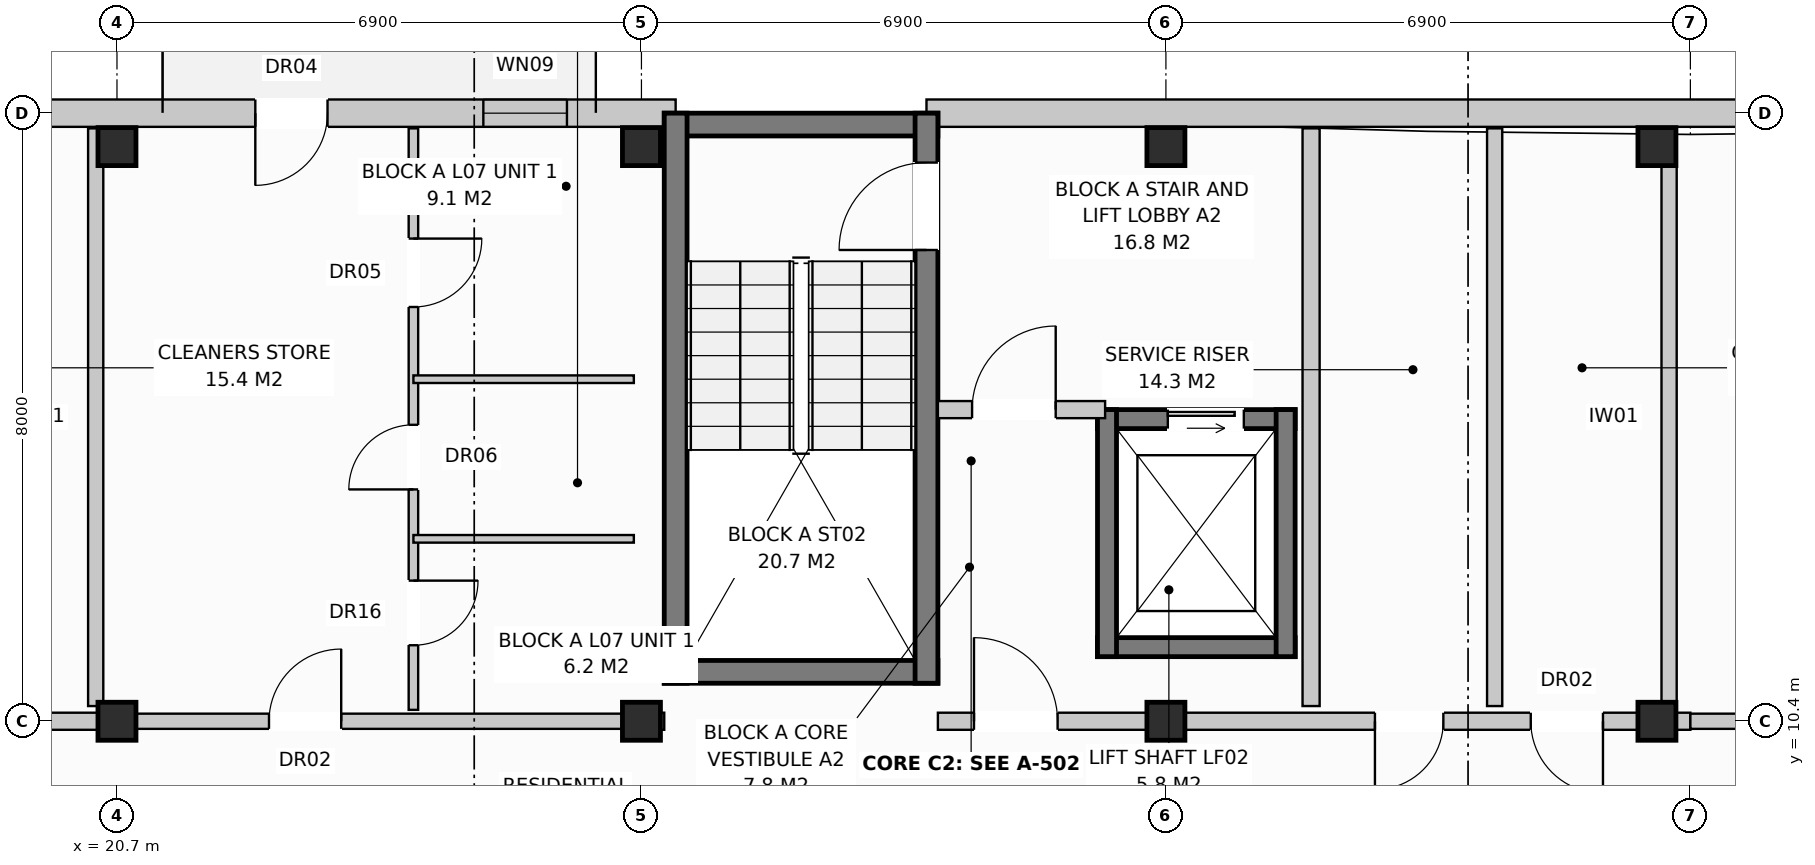
"""IFC4 building model, lengths in metres.
Left out: names, types, materials, properties, quantities, classifications, styles, units other than length and angle.
Written with IfcOpenShell. Run it as: python <this file> out.ifc"""

import sys

from ifc_helpers import new_model, si_unit, direction, frame, frame_2d, origin, origin_with_axes, origin_2d, place, context, subcontext, project, spatial, rectangle, extrude, element, fill, save


model = new_model("IFC4")
c1 = context("Model", 3, precision=1e-05, world=origin(), true_north=direction((0.0, 1.0)))
c2 = subcontext(c1, "Body", "Model", "MODEL_VIEW")
j1 = project(units=[si_unit("LENGTHUNIT", "METRE"), si_unit("PLANEANGLEUNIT", "RADIAN")], contexts=[c1])
p1 = place(None, origin())
s1 = spatial("IfcSite", under=j1, at=p1, CompositionType="ELEMENT")
p2 = place(p1, origin())
s2 = spatial("IfcBuilding", under=s1, at=p2, CompositionType="ELEMENT")
p3 = place(p2, frame((0.0, 0.0, 24.0)))
s3 = spatial("IfcBuildingStorey", under=s2, at=p3, CompositionType="ELEMENT", Elevation=24.0)
for number, where, z_axis, x_axis in (
    (1, (20.7, 10.4, 0.0), (0.0, 0.0, 1.0), (1.0, 0.0, 0.0)),
    (2, (20.7, 17.96, 0.0), (0.0, 0.0, 1.0), (1.0, 0.0, 0.0)),
    (3, (27.6, 10.4, 0.0), (0.0, 0.0, 1.0), (1.0, 0.0, 0.0)),
    (4, (27.6, 17.96, 0.0), (0.0, 0.0, 1.0), (1.0, 0.0, 0.0)),
    (5, (34.5, 10.4, 0.0), (0.0, 0.0, 1.0), (1.0, 0.0, 0.0)),
    (6, (34.5, 17.96, 0.0), (0.0, 0.0, 1.0), (1.0, 0.0, 0.0)),
    (7, (40.96, 10.4, 0.0), (0.0, 0.0, 1.0), (1.0, 0.0, 0.0)),
    (8, (40.96, 17.96, 0.0), (0.0, 0.0, 1.0), (1.0, 0.0, 0.0)),
):
    element("IfcColumn", number, at=place(p3, frame(where, z_axis=z_axis, x_axis=x_axis)), inside=s3, PredefinedType="COLUMN", context=c2, shape_type="SweptSolid", body=[
        extrude(rectangle(XDim=0.5, YDim=0.5, at=origin_2d()), origin(), (0.0, 0.0, 1.0), 3.2),
    ])
p4 = place(p3, frame((10.65, 18.4, 0.0), z_axis=(0.0, 0.0, 1.0), x_axis=(1.0, 0.0, 0.0)))
e9 = element("IfcWall", 9, at=p4, inside=s3, PredefinedType="STANDARD", context=c2, shape_type="SweptSolid", body=[
    extrude(rectangle(XDim=17.4, YDim=0.36, at=frame_2d((8.7, 0.0))), origin(), (0.0, 0.0, 1.0), 2.95),
])
p5 = place(p4, frame((11.87, 0.0, 0.0)))
e10 = element("IfcOpeningElement", 10, at=p5, cuts=e9, PredefinedType="OPENING", context=c2, shape_type="SweptSolid", body=[
    extrude(rectangle(XDim=0.95, YDim=2.1, at=frame_2d((0.475, 1.05))), frame((0.0, 0.192, 0.0), z_axis=(0.0, -1.0, 0.0), x_axis=(1.0, 0.0, 0.0)), (0.0, 0.0, 1.0), 0.384),
])
p6 = place(p4, frame((14.87, 0.0, 0.72)))
e11 = element("IfcOpeningElement", 11, at=p6, cuts=e9, PredefinedType="OPENING", context=c2, shape_type="SweptSolid", body=[
    extrude(rectangle(XDim=1.1, YDim=1.5, at=frame_2d((0.55, 0.75))), frame((0.0, 0.192, 0.0), z_axis=(0.0, -1.0, 0.0), x_axis=(1.0, 0.0, 0.0)), (0.0, 0.0, 1.0), 0.384),
])
p7 = place(p3, frame((31.35, 18.4, 0.0), z_axis=(0.0, 0.0, 1.0), x_axis=(1.0, 0.0, 0.0)))
e12 = element("IfcWall", 12, at=p7, inside=s3, PredefinedType="STANDARD", context=c2, shape_type="SweptSolid", body=[
    extrude(rectangle(XDim=23.68, YDim=0.36, at=frame_2d((11.84, 0.0))), origin(), (0.0, 0.0, 1.0), 2.95),
])
p8 = place(p7, frame((14.018, 0.0, 0.0)))
e13 = element("IfcOpeningElement", 13, at=p8, cuts=e12, PredefinedType="OPENING", context=c2, shape_type="SweptSolid", body=[
    extrude(rectangle(XDim=0.95, YDim=2.1, at=frame_2d((0.475, 1.05))), frame((0.0, 0.192, 0.0), z_axis=(0.0, -1.0, 0.0), x_axis=(1.0, 0.0, 0.0)), (0.0, 0.0, 1.0), 0.384),
])
p9 = place(p7, frame((11.77, 0.0, 0.8)))
e14 = element("IfcOpeningElement", 14, at=p9, cuts=e12, PredefinedType="OPENING", context=c2, shape_type="SweptSolid", body=[
    extrude(rectangle(XDim=1.9, YDim=1.85, at=frame_2d((0.95, 0.925))), frame((0.0, 0.192, 0.0), z_axis=(0.0, -1.0, 0.0), x_axis=(1.0, 0.0, 0.0)), (0.0, 0.0, 1.0), 0.384),
])
p10 = place(p7, frame((17.87, 0.0, 0.72)))
e15 = element("IfcOpeningElement", 15, at=p10, cuts=e12, PredefinedType="OPENING", context=c2, shape_type="SweptSolid", body=[
    extrude(rectangle(XDim=1.1, YDim=1.5, at=frame_2d((0.55, 0.75))), frame((0.0, 0.192, 0.0), z_axis=(0.0, -1.0, 0.0), x_axis=(1.0, 0.0, 0.0)), (0.0, 0.0, 1.0), 0.384),
])
p11 = place(p7, frame((20.72, 0.0, 0.8)))
e16 = element("IfcOpeningElement", 16, at=p11, cuts=e12, PredefinedType="OPENING", context=c2, shape_type="SweptSolid", body=[
    extrude(rectangle(XDim=1.8, YDim=1.7, at=frame_2d((0.9, 0.85))), frame((0.0, 0.192, 0.0), z_axis=(0.0, -1.0, 0.0), x_axis=(1.0, 0.0, 0.0)), (0.0, 0.0, 1.0), 0.384),
])
p12 = place(p3, frame((20.42, 10.6, 0.0), z_axis=(0.0, 0.0, 1.0), x_axis=(0.0, 1.0, 0.0)))
e17 = element("IfcWall", 17, at=p12, inside=s3, PredefinedType="PARTITIONING", context=c2, shape_type="SweptSolid", body=[
    extrude(rectangle(XDim=7.6, YDim=0.2, at=frame_2d((3.8, 0.0))), origin(), (0.0, 0.0, 1.0), 2.95),
])
p13 = place(p3, frame((10.8, 10.4, 0.0), z_axis=(0.0, 0.0, 1.0), x_axis=(1.0, 0.0, 0.0)))
e18 = element("IfcWall", 18, at=p13, inside=s3, PredefinedType="PARTITIONING", context=c2, shape_type="SweptSolid", body=[
    extrude(rectangle(XDim=9.9, YDim=0.225, at=frame_2d((4.95, 0.0))), origin(), (0.0, 0.0, 1.0), 2.39),
])
p14 = place(p13, frame((0.475, 0.0, 0.0)))
e19 = element("IfcOpeningElement", 19, at=p14, cuts=e18, PredefinedType="OPENING", context=c2, shape_type="SweptSolid", body=[
    extrude(rectangle(XDim=1.1, YDim=2.15, at=frame_2d((0.55, 1.075))), frame((0.0, 0.125, 0.0), z_axis=(0.0, -1.0, 0.0), x_axis=(1.0, 0.0, 0.0)), (0.0, 0.0, 1.0), 0.249),
])
p15 = place(p13, frame((5.75, 0.0, 0.0)))
e20 = element("IfcOpeningElement", 20, at=p15, cuts=e18, PredefinedType="OPENING", context=c2, shape_type="SweptSolid", body=[
    extrude(rectangle(XDim=0.9, YDim=2.1, at=frame_2d((0.45, 1.05))), frame((0.0, 0.125, 0.0), z_axis=(0.0, -1.0, 0.0), x_axis=(1.0, 0.0, 0.0)), (0.0, 0.0, 1.0), 0.249),
])
p16 = place(p13, frame((7.8, 0.0, 0.0)))
e21 = element("IfcOpeningElement", 21, at=p16, cuts=e18, PredefinedType="OPENING", context=c2, shape_type="SweptSolid", body=[
    extrude(rectangle(XDim=0.95, YDim=2.15, at=frame_2d((0.475, 1.075))), frame((0.0, 0.125, 0.0), z_axis=(0.0, -1.0, 0.0), x_axis=(1.0, 0.0, 0.0)), (0.0, 0.0, 1.0), 0.249),
])
for number, where, z_axis, x_axis in (
    (22, (27.9, 18.25, 0.0), (0.0, 0.0, 1.0), (1.0, 0.0, 0.0)),
    (23, (27.9, 11.05, 0.0), (0.0, 0.0, 1.0), (1.0, 0.0, 0.0)),
):
    element("IfcWall", number, at=place(p3, frame(where, z_axis=z_axis, x_axis=x_axis)), inside=s3, PredefinedType="SHEAR", context=c2, shape_type="SweptSolid", body=[
        extrude(rectangle(XDim=3.6, YDim=0.3, at=frame_2d((1.8, 0.0))), origin(), (0.0, 0.0, 1.0), 2.95),
    ])
p17 = place(p3, frame((28.05, 10.9, 0.0), z_axis=(0.0, 0.0, 1.0), x_axis=(0.0, 1.0, 0.0)))
e24 = element("IfcWall", 24, at=p17, inside=s3, PredefinedType="SHEAR", context=c2, shape_type="SweptSolid", body=[
    extrude(rectangle(XDim=7.5, YDim=0.3, at=frame_2d((3.75, 0.0))), origin(), (0.0, 0.0, 1.0), 2.95),
])
p18 = place(p3, frame((31.35, 10.9, 0.0), z_axis=(0.0, 0.0, 1.0), x_axis=(0.0, 1.0, 0.0)))
e25 = element("IfcWall", 25, at=p18, inside=s3, PredefinedType="SHEAR", context=c2, shape_type="SweptSolid", body=[
    extrude(rectangle(XDim=7.5, YDim=0.3, at=frame_2d((3.75, 0.0))), origin(), (0.0, 0.0, 1.0), 2.95),
])
p19 = place(p18, frame((5.7, 0.0, 0.0)))
e26 = element("IfcOpeningElement", 26, at=p19, cuts=e25, PredefinedType="OPENING", context=c2, shape_type="SweptSolid", body=[
    extrude(rectangle(XDim=1.15, YDim=2.15, at=frame_2d((0.575, 1.075))), frame((0.0, 0.162, 0.0), z_axis=(0.0, -1.0, 0.0), x_axis=(1.0, 0.0, 0.0)), (0.0, 0.0, 1.0), 0.324),
])
p20 = place(p3, frame((33.6, 14.375, 0.0), z_axis=(0.0, 0.0, 1.0), x_axis=(1.0, 0.0, 0.0)))
e27 = element("IfcWall", 27, at=p20, inside=s3, PredefinedType="SHEAR", context=c2, shape_type="SweptSolid", body=[
    extrude(rectangle(XDim=2.6, YDim=0.25, at=frame_2d((1.3, 0.0))), origin(), (0.0, 0.0, 1.0), 2.95),
])
p21 = place(p20, frame((0.925, 0.0, 0.0)))
e28 = element("IfcOpeningElement", 28, at=p21, cuts=e27, PredefinedType="OPENING", context=c2, shape_type="SweptSolid", body=[
    extrude(rectangle(XDim=1.0, YDim=2.1, at=frame_2d((0.5, 1.05))), frame((0.0, 0.137, 0.0), z_axis=(0.0, -1.0, 0.0), x_axis=(1.0, 0.0, 0.0)), (0.0, 0.0, 1.0), 0.274),
])
p22 = place(p3, frame((33.6, 11.375, 0.0), z_axis=(0.0, 0.0, 1.0), x_axis=(1.0, 0.0, 0.0)))
e29 = element("IfcWall", 29, at=p22, inside=s3, PredefinedType="SHEAR", context=c2, shape_type="SweptSolid", body=[
    extrude(rectangle(XDim=2.6, YDim=0.25, at=frame_2d((1.3, 0.0))), origin(), (0.0, 0.0, 1.0), 2.95),
])
for number, where, z_axis, x_axis in (
    (30, (33.725, 11.25, 0.0), (0.0, 0.0, 1.0), (0.0, 1.0, 0.0)),
    (31, (36.075, 11.25, 0.0), (0.0, 0.0, 1.0), (0.0, 1.0, 0.0)),
):
    element("IfcWall", number, at=place(p3, frame(where, z_axis=z_axis, x_axis=x_axis)), inside=s3, PredefinedType="SHEAR", context=c2, shape_type="SweptSolid", body=[
        extrude(rectangle(XDim=3.25, YDim=0.25, at=frame_2d((1.625, 0.0))), origin(), (0.0, 0.0, 1.0), 2.95),
    ])
p23 = place(p3, frame((36.41, 10.6, 0.0), z_axis=(0.0, 0.0, 1.0), x_axis=(0.0, 1.0, 0.0)))
e32 = element("IfcWall", 32, at=p23, inside=s3, PredefinedType="PARTITIONING", context=c2, shape_type="SweptSolid", body=[
    extrude(rectangle(XDim=7.6, YDim=0.225, at=frame_2d((3.8, 0.0))), origin(), (0.0, 0.0, 1.0), 2.59),
])
p24 = place(p3, frame((31.5, 14.5, 0.0), z_axis=(0.0, 0.0, 1.0), x_axis=(1.0, 0.0, 0.0)))
e33 = element("IfcWall", 33, at=p24, inside=s3, PredefinedType="PARTITIONING", context=c2, shape_type="SweptSolid", body=[
    extrude(rectangle(XDim=2.2, YDim=0.225, at=frame_2d((1.1, 0.0))), origin(), (0.0, 0.0, 1.0), 2.95),
])
p25 = place(p24, frame((0.45, 0.0, 0.0)))
e34 = element("IfcOpeningElement", 34, at=p25, cuts=e33, PredefinedType="OPENING", context=c2, shape_type="SweptSolid", body=[
    extrude(rectangle(XDim=1.1, YDim=2.15, at=frame_2d((0.55, 1.075))), frame((0.0, 0.125, 0.0), z_axis=(0.0, -1.0, 0.0), x_axis=(1.0, 0.0, 0.0)), (0.0, 0.0, 1.0), 0.249),
])
p26 = place(p3, frame((27.6, 10.4, 0.0), z_axis=(0.0, 0.0, 1.0), x_axis=(1.0, 0.0, 0.0)))
e35 = element("IfcWall", 35, at=p26, inside=s3, PredefinedType="PARTITIONING", context=c2, shape_type="SweptSolid", body=[
    extrude(rectangle(XDim=0.3, YDim=0.225, at=frame_2d((0.15, 0.0))), origin(), (0.0, 0.0, 1.0), 2.95),
])
for number, where, z_axis, x_axis in (
    (36, (38.825, 10.6, 0.0), (0.0, 0.0, 1.0), (0.0, 1.0, 0.0)),
    (37, (41.12, 10.6, 0.0), (0.0, 0.0, 1.0), (0.0, 1.0, 0.0)),
):
    element("IfcWall", number, at=place(p3, frame(where, z_axis=z_axis, x_axis=x_axis)), inside=s3, PredefinedType="PARTITIONING", context=c2, shape_type="SweptSolid", body=[
        extrude(rectangle(XDim=7.6, YDim=0.2, at=frame_2d((3.8, 0.0))), origin(), (0.0, 0.0, 1.0), 2.95),
    ])
p27 = place(p3, frame((31.5, 10.4, 0.0), z_axis=(0.0, 0.0, 1.0), x_axis=(1.0, 0.0, 0.0)))
e38 = element("IfcWall", 38, at=p27, inside=s3, PredefinedType="PARTITIONING", context=c2, shape_type="SweptSolid", body=[
    extrude(rectangle(XDim=9.9, YDim=0.225, at=frame_2d((4.95, 0.0))), origin(), (0.0, 0.0, 1.0), 2.39),
])
p28 = place(p27, frame((0.475, 0.0, 0.0)))
e39 = element("IfcOpeningElement", 39, at=p28, cuts=e38, PredefinedType="OPENING", context=c2, shape_type="SweptSolid", body=[
    extrude(rectangle(XDim=1.1, YDim=2.15, at=frame_2d((0.55, 1.075))), frame((0.0, 0.125, 0.0), z_axis=(0.0, -1.0, 0.0), x_axis=(1.0, 0.0, 0.0)), (0.0, 0.0, 1.0), 0.249),
])
p29 = place(p27, frame((5.75, 0.0, 0.0)))
e40 = element("IfcOpeningElement", 40, at=p29, cuts=e38, PredefinedType="OPENING", context=c2, shape_type="SweptSolid", body=[
    extrude(rectangle(XDim=0.9, YDim=2.1, at=frame_2d((0.45, 1.05))), frame((0.0, 0.125, 0.0), z_axis=(0.0, -1.0, 0.0), x_axis=(1.0, 0.0, 0.0)), (0.0, 0.0, 1.0), 0.249),
])
p30 = place(p27, frame((7.8, 0.0, 0.0)))
e41 = element("IfcOpeningElement", 41, at=p30, cuts=e38, PredefinedType="OPENING", context=c2, shape_type="SweptSolid", body=[
    extrude(rectangle(XDim=0.95, YDim=2.15, at=frame_2d((0.475, 1.075))), frame((0.0, 0.125, 0.0), z_axis=(0.0, -1.0, 0.0), x_axis=(1.0, 0.0, 0.0)), (0.0, 0.0, 1.0), 0.249),
])
p31 = place(p3, frame((20.7, 10.4, 0.0), z_axis=(0.0, 0.0, 1.0), x_axis=(1.0, 0.0, 0.0)))
e42 = element("IfcWall", 42, at=p31, inside=s3, PredefinedType="PARTITIONING", context=c2, shape_type="SweptSolid", body=[
    extrude(rectangle(XDim=6.9, YDim=0.2, at=frame_2d((3.45, 0.0))), origin(), (0.0, 0.0, 1.0), 2.39),
])
p32 = place(p31, frame((2.0, 0.0, 0.0)))
e43 = element("IfcOpeningElement", 43, at=p32, cuts=e42, PredefinedType="OPENING", context=c2, shape_type="SweptSolid", body=[
    extrude(rectangle(XDim=0.95, YDim=2.15, at=frame_2d((0.475, 1.075))), frame((0.0, 0.112, 0.0), z_axis=(0.0, -1.0, 0.0), x_axis=(1.0, 0.0, 0.0)), (0.0, 0.0, 1.0), 0.224),
])
p33 = place(p3, frame((24.6, 10.55, 0.0), z_axis=(0.0, 0.0, 1.0), x_axis=(0.0, 1.0, 0.0)))
e44 = element("IfcWall", 44, at=p33, inside=s3, PredefinedType="PARTITIONING", context=c2, shape_type="SweptSolid", body=[
    extrude(rectangle(XDim=7.65, YDim=0.125, at=frame_2d((3.825, 0.0))), origin(), (0.0, 0.0, 1.0), 2.95),
])
p34 = place(p33, frame((0.85, 0.0, 0.0)))
e45 = element("IfcOpeningElement", 45, at=p34, cuts=e44, PredefinedType="OPENING", context=c2, shape_type="SweptSolid", body=[
    extrude(rectangle(XDim=0.85, YDim=2.1, at=frame_2d((0.425, 1.05))), frame((0.0, 0.074, 0.0), z_axis=(0.0, -1.0, 0.0), x_axis=(1.0, 0.0, 0.0)), (0.0, 0.0, 1.0), 0.149),
])
p35 = place(p33, frame((2.9, 0.0, 0.0)))
e46 = element("IfcOpeningElement", 46, at=p35, cuts=e44, PredefinedType="OPENING", context=c2, shape_type="SweptSolid", body=[
    extrude(rectangle(XDim=0.85, YDim=2.05, at=frame_2d((0.425, 1.025))), frame((0.0, 0.074, 0.0), z_axis=(0.0, -1.0, 0.0), x_axis=(1.0, 0.0, 0.0)), (0.0, 0.0, 1.0), 0.149),
])
p36 = place(p33, frame((5.3, 0.0, 0.0)))
e47 = element("IfcOpeningElement", 47, at=p36, cuts=e44, PredefinedType="OPENING", context=c2, shape_type="SweptSolid", body=[
    extrude(rectangle(XDim=0.9, YDim=2.1, at=frame_2d((0.45, 1.05))), frame((0.0, 0.074, 0.0), z_axis=(0.0, -1.0, 0.0), x_axis=(1.0, 0.0, 0.0)), (0.0, 0.0, 1.0), 0.149),
])
for number, where, z_axis, x_axis in (
    (48, (24.6, 12.8, 0.0), (0.0, 0.0, 1.0), (1.0, 0.0, 0.0)),
    (49, (24.6, 14.9, 0.0), (0.0, 0.0, 1.0), (1.0, 0.0, 0.0)),
):
    element("IfcWall", number, at=place(p3, frame(where, z_axis=z_axis, x_axis=x_axis)), inside=s3, PredefinedType="PARTITIONING", context=c2, shape_type="SweptSolid", body=[
        extrude(rectangle(XDim=2.9, YDim=0.1, at=frame_2d((1.45, 0.0))), origin(), (0.0, 0.0, 1.0), 2.95),
    ])
p37 = place(p3, frame((41.4, 10.4, 0.0), z_axis=(0.0, 0.0, 1.0), x_axis=(1.0, 0.0, 0.0)))
e50 = element("IfcWall", 50, at=p37, inside=s3, PredefinedType="PARTITIONING", context=c2, shape_type="SweptSolid", body=[
    extrude(rectangle(XDim=13.8, YDim=0.2, at=frame_2d((6.9, 0.0))), origin(), (0.0, 0.0, 1.0), 2.39),
])
p38 = place(p37, frame((2.4, 0.0, 0.0)))
e51 = element("IfcOpeningElement", 51, at=p38, cuts=e50, PredefinedType="OPENING", context=c2, shape_type="SweptSolid", body=[
    extrude(rectangle(XDim=0.95, YDim=2.15, at=frame_2d((0.475, 1.075))), frame((0.0, 0.112, 0.0), z_axis=(0.0, -1.0, 0.0), x_axis=(1.0, 0.0, 0.0)), (0.0, 0.0, 1.0), 0.224),
])
p39 = place(p5, frame((0.95, 0.0, 0.0), z_axis=(0.0, 0.0, 1.0), x_axis=(-1.0, 0.0, 0.0)))
e52 = element("IfcDoor", 52, at=p39, inside=s3, OperationType="SINGLE_SWING_LEFT", PredefinedType="DOOR", context=c2, shape_type="SweptSolid", body=[
    extrude(rectangle(XDim=0.95, YDim=2.1, at=frame_2d((0.475, 1.05))), frame((0.0, 0.025, 0.0), z_axis=(0.0, -1.0, 0.0), x_axis=(1.0, 0.0, 0.0)), (0.0, 0.0, 1.0), 0.05),
])
fill(e10, e52)
p40 = place(p6, origin_with_axes())
e53 = element("IfcWindow", 53, at=p40, inside=s3, PartitioningType="SINGLE_PANEL", PredefinedType="WINDOW", context=c2, shape_type="SweptSolid", body=[
    extrude(rectangle(XDim=1.1, YDim=1.5, at=frame_2d((0.55, 0.75))), frame((0.0, 0.03, 0.0), z_axis=(0.0, -1.0, 0.0), x_axis=(1.0, 0.0, 0.0)), (0.0, 0.0, 1.0), 0.06),
])
fill(e11, e53)
p41 = place(p19, origin_with_axes())
e54 = element("IfcDoor", 54, at=p41, inside=s3, OperationType="SINGLE_SWING_LEFT", PredefinedType="DOOR", context=c2, shape_type="SweptSolid", body=[
    extrude(rectangle(XDim=1.15, YDim=2.15, at=frame_2d((0.575, 1.075))), frame((0.0, 0.025, 0.0), z_axis=(0.0, -1.0, 0.0), x_axis=(1.0, 0.0, 0.0)), (0.0, 0.0, 1.0), 0.05),
])
fill(e26, e54)
p42 = place(p21, origin_with_axes())
e55 = element("IfcDoor", 55, at=p42, inside=s3, OperationType="SLIDING_TO_LEFT", PredefinedType="DOOR", context=c2, shape_type="SweptSolid", body=[
    extrude(rectangle(XDim=1.0, YDim=2.1, at=frame_2d((0.5, 1.05))), frame((0.0, 0.025, 0.0), z_axis=(0.0, -1.0, 0.0), x_axis=(1.0, 0.0, 0.0)), (0.0, 0.0, 1.0), 0.05),
])
fill(e28, e55)
p43 = place(p25, origin_with_axes())
e56 = element("IfcDoor", 56, at=p43, inside=s3, OperationType="SINGLE_SWING_RIGHT", PredefinedType="DOOR", context=c2, shape_type="SweptSolid", body=[
    extrude(rectangle(XDim=1.1, YDim=2.15, at=frame_2d((0.55, 1.075))), frame((0.0, 0.025, 0.0), z_axis=(0.0, -1.0, 0.0), x_axis=(1.0, 0.0, 0.0)), (0.0, 0.0, 1.0), 0.05),
])
fill(e34, e56)
p44 = place(p28, origin_with_axes())
e57 = element("IfcDoor", 57, at=p44, inside=s3, OperationType="SINGLE_SWING_LEFT", PredefinedType="DOOR", context=c2, shape_type="SweptSolid", body=[
    extrude(rectangle(XDim=1.1, YDim=2.15, at=frame_2d((0.55, 1.075))), frame((0.0, 0.025, 0.0), z_axis=(0.0, -1.0, 0.0), x_axis=(1.0, 0.0, 0.0)), (0.0, 0.0, 1.0), 0.05),
])
fill(e39, e57)
p45 = place(p29, frame((0.9, 0.0, 0.0), z_axis=(0.0, 0.0, 1.0), x_axis=(-1.0, 0.0, 0.0)))
e58 = element("IfcDoor", 58, at=p45, inside=s3, OperationType="SINGLE_SWING_LEFT", PredefinedType="DOOR", context=c2, shape_type="SweptSolid", body=[
    extrude(rectangle(XDim=0.9, YDim=2.1, at=frame_2d((0.45, 1.05))), frame((0.0, 0.025, 0.0), z_axis=(0.0, -1.0, 0.0), x_axis=(1.0, 0.0, 0.0)), (0.0, 0.0, 1.0), 0.05),
])
fill(e40, e58)
p46 = place(p30, frame((0.95, 0.0, 0.0), z_axis=(0.0, 0.0, 1.0), x_axis=(-1.0, 0.0, 0.0)))
e59 = element("IfcDoor", 59, at=p46, inside=s3, OperationType="SINGLE_SWING_RIGHT", PredefinedType="DOOR", context=c2, shape_type="SweptSolid", body=[
    extrude(rectangle(XDim=0.95, YDim=2.15, at=frame_2d((0.475, 1.075))), frame((0.0, 0.025, 0.0), z_axis=(0.0, -1.0, 0.0), x_axis=(1.0, 0.0, 0.0)), (0.0, 0.0, 1.0), 0.05),
])
fill(e41, e59)
p47 = place(p32, origin_with_axes())
e60 = element("IfcDoor", 60, at=p47, inside=s3, OperationType="SINGLE_SWING_RIGHT", PredefinedType="DOOR", context=c2, shape_type="SweptSolid", body=[
    extrude(rectangle(XDim=0.95, YDim=2.15, at=frame_2d((0.475, 1.075))), frame((0.0, 0.025, 0.0), z_axis=(0.0, -1.0, 0.0), x_axis=(1.0, 0.0, 0.0)), (0.0, 0.0, 1.0), 0.05),
])
fill(e43, e60)
p48 = place(p34, frame((0.85, 0.0, 0.0), z_axis=(0.0, 0.0, 1.0), x_axis=(-1.0, 0.0, 0.0)))
e61 = element("IfcDoor", 61, at=p48, inside=s3, OperationType="SINGLE_SWING_RIGHT", PredefinedType="DOOR", context=c2, shape_type="SweptSolid", body=[
    extrude(rectangle(XDim=0.85, YDim=2.1, at=frame_2d((0.425, 1.05))), frame((0.0, 0.025, 0.0), z_axis=(0.0, -1.0, 0.0), x_axis=(1.0, 0.0, 0.0)), (0.0, 0.0, 1.0), 0.05),
])
fill(e45, e61)
p49 = place(p35, origin_with_axes())
e62 = element("IfcDoor", 62, at=p49, inside=s3, OperationType="SINGLE_SWING_LEFT", PredefinedType="DOOR", context=c2, shape_type="SweptSolid", body=[
    extrude(rectangle(XDim=0.85, YDim=2.05, at=frame_2d((0.425, 1.025))), frame((0.0, 0.025, 0.0), z_axis=(0.0, -1.0, 0.0), x_axis=(1.0, 0.0, 0.0)), (0.0, 0.0, 1.0), 0.05),
])
fill(e46, e62)
p50 = place(p36, frame((0.9, 0.0, 0.0), z_axis=(0.0, 0.0, 1.0), x_axis=(-1.0, 0.0, 0.0)))
e63 = element("IfcDoor", 63, at=p50, inside=s3, OperationType="SINGLE_SWING_RIGHT", PredefinedType="DOOR", context=c2, shape_type="SweptSolid", body=[
    extrude(rectangle(XDim=0.9, YDim=2.1, at=frame_2d((0.45, 1.05))), frame((0.0, 0.025, 0.0), z_axis=(0.0, -1.0, 0.0), x_axis=(1.0, 0.0, 0.0)), (0.0, 0.0, 1.0), 0.05),
])
fill(e47, e63)
save(model, sys.argv[1])
